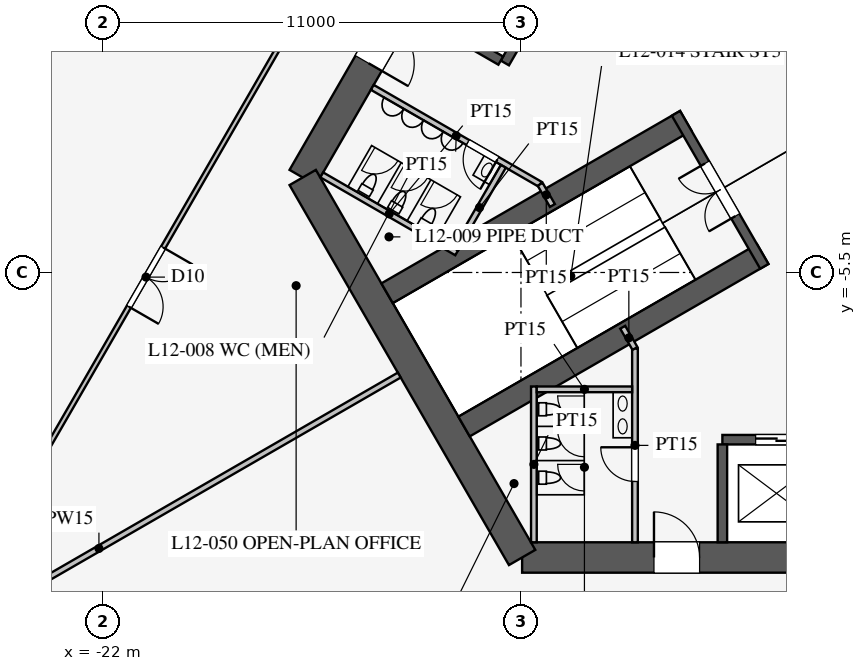
"""IFC4 building model, lengths in metres.
Left out: names, types, materials, properties, quantities, classifications, styles, units other than length and angle.
Written with IfcOpenShell. Run it as: python <this file> out.ifc"""

import sys

from ifc_helpers import new_model, si_unit, direction, frame, frame_2d, origin, place, context, subcontext, project, spatial, rectangle, extrude, element, fill, save


model = new_model("IFC4")
c1 = context("Model", 3, precision=1e-05, world=origin(), true_north=direction((0.0, 1.0)))
c2 = subcontext(c1, "Body", "Model", "MODEL_VIEW")
j1 = project(units=[si_unit("LENGTHUNIT", "METRE"), si_unit("PLANEANGLEUNIT", "RADIAN")], contexts=[c1])
p1 = place(None, origin())
s1 = spatial("IfcSite", under=j1, at=p1, CompositionType="ELEMENT")
p2 = place(p1, origin())
s2 = spatial("IfcBuilding", under=s1, at=p2, CompositionType="ELEMENT")
p3 = place(p2, frame((0.0, 0.0, 54.3)))
s3 = spatial("IfcBuildingStorey", under=s2, at=p3, CompositionType="ELEMENT", Elevation=54.3)
p4 = place(p3, frame((-10.97, -13.0, 0.0), z_axis=(0.0, 0.0, 1.0), x_axis=(1.0, 0.0, 0.0)))
e1 = element("IfcWall", 1, at=p4, inside=s3, PredefinedType="SHEAR", context=c2, shape_type="SweptSolid", body=[
    extrude(rectangle(XDim=21.939, YDim=0.8, at=frame_2d((10.97, 0.0))), origin(), (0.0, 0.0, 1.0), 4.2),
])
p5 = place(p4, frame((17.27, 0.0, 0.0)))
e2 = element("IfcOpeningElement", 2, at=p5, cuts=e1, PredefinedType="OPENING", context=c2, shape_type="SweptSolid", body=[
    extrude(rectangle(XDim=1.2, YDim=2.1, at=frame_2d((0.6, 1.05))), frame((0.0, 0.41, 0.0), z_axis=(0.0, -1.0, 0.0), x_axis=(1.0, 0.0, 0.0)), (0.0, 0.0, 1.0), 0.82),
])
p6 = place(p4, frame((3.47, 0.0, 0.0)))
e3 = element("IfcOpeningElement", 3, at=p6, cuts=e1, PredefinedType="OPENING", context=c2, shape_type="SweptSolid", body=[
    extrude(rectangle(XDim=1.2, YDim=2.1, at=frame_2d((0.6, 1.05))), frame((0.0, 0.41, 0.0), z_axis=(0.0, -1.0, 0.0), x_axis=(1.0, 0.0, 0.0)), (0.0, 0.0, 1.0), 0.82),
])
p7 = place(p3, frame((-5.773, 16.0, 0.0), z_axis=(0.0, 0.0, 1.0), x_axis=(-0.500002442456, -0.866023993627, 0.0)))
e4 = element("IfcWall", 4, at=p7, inside=s3, PredefinedType="SHEAR", context=c2, shape_type="SweptSolid", body=[
    extrude(rectangle(XDim=21.939, YDim=0.8, at=frame_2d((10.97, 0.0))), origin(), (0.0, 0.0, 1.0), 4.2),
])
p8 = place(p7, frame((17.27, 0.0, 0.0)))
e5 = element("IfcOpeningElement", 5, at=p8, cuts=e4, PredefinedType="OPENING", context=c2, shape_type="SweptSolid", body=[
    extrude(rectangle(XDim=1.2, YDim=2.1, at=frame_2d((0.6, 1.05))), frame((0.0, 0.41, 0.0), z_axis=(0.0, -1.0, 0.0), x_axis=(1.0, 0.0, 0.0)), (0.0, 0.0, 1.0), 0.82),
])
p9 = place(p7, frame((3.47, 0.0, 0.0)))
e6 = element("IfcOpeningElement", 6, at=p9, cuts=e4, PredefinedType="OPENING", context=c2, shape_type="SweptSolid", body=[
    extrude(rectangle(XDim=1.2, YDim=2.1, at=frame_2d((0.6, 1.05))), frame((0.0, 0.41, 0.0), z_axis=(0.0, -1.0, 0.0), x_axis=(1.0, 0.0, 0.0)), (0.0, 0.0, 1.0), 0.82),
])
p10 = place(p3, frame((-16.743, -3.0, 0.0), z_axis=(0.0, 0.0, 1.0), x_axis=(0.499995765644, -0.866027848477, 0.0)))
e7 = element("IfcWall", 7, at=p10, inside=s3, PredefinedType="SHEAR", context=c2, shape_type="SweptSolid", body=[
    extrude(rectangle(XDim=11.547, YDim=0.8, at=frame_2d((5.773, 0.0))), origin(), (0.0, 0.0, 1.0), 4.2),
])
p11 = place(p3, frame((-5.7, -9.9, 0.0), z_axis=(0.0, 0.0, 1.0), x_axis=(1.0, 0.0, 0.0)))
e8 = element("IfcWall", 8, at=p11, inside=s3, PredefinedType="SHEAR", context=c2, shape_type="SweptSolid", body=[
    extrude(rectangle(XDim=11.4, YDim=0.25, at=frame_2d((5.7, 0.0))), origin(), (0.0, 0.0, 1.0), 4.2),
])
p12 = place(p11, frame((0.875, 0.0, 0.0)))
e9 = element("IfcOpeningElement", 9, at=p12, cuts=e8, PredefinedType="OPENING", context=c2, shape_type="SweptSolid", body=[
    extrude(rectangle(XDim=1.1, YDim=2.2, at=frame_2d((0.55, 1.1))), frame((0.0, 0.135, 0.0), z_axis=(0.0, -1.0, 0.0), x_axis=(1.0, 0.0, 0.0)), (0.0, 0.0, 1.0), 0.27),
])
p13 = place(p11, frame((3.725, 0.0, 0.0)))
e10 = element("IfcOpeningElement", 10, at=p13, cuts=e8, PredefinedType="OPENING", context=c2, shape_type="SweptSolid", body=[
    extrude(rectangle(XDim=1.1, YDim=2.2, at=frame_2d((0.55, 1.1))), frame((0.0, 0.135, 0.0), z_axis=(0.0, -1.0, 0.0), x_axis=(1.0, 0.0, 0.0)), (0.0, 0.0, 1.0), 0.27),
])
p14 = place(p11, frame((6.575, 0.0, 0.0)))
e11 = element("IfcOpeningElement", 11, at=p14, cuts=e8, PredefinedType="OPENING", context=c2, shape_type="SweptSolid", body=[
    extrude(rectangle(XDim=1.1, YDim=2.2, at=frame_2d((0.55, 1.1))), frame((0.0, 0.135, 0.0), z_axis=(0.0, -1.0, 0.0), x_axis=(1.0, 0.0, 0.0)), (0.0, 0.0, 1.0), 0.27),
])
p15 = place(p11, frame((9.425, 0.0, 0.0)))
e12 = element("IfcOpeningElement", 12, at=p15, cuts=e8, PredefinedType="OPENING", context=c2, shape_type="SweptSolid", body=[
    extrude(rectangle(XDim=1.1, YDim=2.2, at=frame_2d((0.55, 1.1))), frame((0.0, 0.135, 0.0), z_axis=(0.0, -1.0, 0.0), x_axis=(1.0, 0.0, 0.0)), (0.0, 0.0, 1.0), 0.27),
])
p16 = place(p3, frame((-5.7, -10.025, 0.0), z_axis=(0.0, 0.0, 1.0), x_axis=(0.0, -1.0, 0.0)))
e13 = element("IfcWall", 13, at=p16, inside=s3, PredefinedType="SHEAR", context=c2, shape_type="SweptSolid", body=[
    extrude(rectangle(XDim=2.575, YDim=0.25, at=frame_2d((1.288, 0.0))), origin(), (0.0, 0.0, 1.0), 4.2),
])
p17 = place(p3, frame((-5.724, 9.886, 0.0), z_axis=(0.0, 0.0, 1.0), x_axis=(-0.500001763848, -0.866024385424, 0.0)))
e14 = element("IfcWall", 14, at=p17, inside=s3, PredefinedType="SHEAR", context=c2, shape_type="SweptSolid", body=[
    extrude(rectangle(XDim=11.4, YDim=0.25, at=frame_2d((5.7, 0.0))), origin(), (0.0, 0.0, 1.0), 4.2),
])
p18 = place(p17, frame((6.525, 0.0, 0.0)))
e15 = element("IfcOpeningElement", 15, at=p18, cuts=e14, PredefinedType="OPENING", context=c2, shape_type="SweptSolid", body=[
    extrude(rectangle(XDim=1.2, YDim=2.2, at=frame_2d((0.6, 1.1))), frame((0.0, 0.135, 0.0), z_axis=(0.0, -1.0, 0.0), x_axis=(1.0, 0.0, 0.0)), (0.0, 0.0, 1.0), 0.27),
])
p19 = place(p17, frame((9.375, 0.0, 0.0)))
e16 = element("IfcOpeningElement", 16, at=p19, cuts=e14, PredefinedType="OPENING", context=c2, shape_type="SweptSolid", body=[
    extrude(rectangle(XDim=1.2, YDim=2.2, at=frame_2d((0.6, 1.1))), frame((0.0, 0.135, 0.0), z_axis=(0.0, -1.0, 0.0), x_axis=(1.0, 0.0, 0.0)), (0.0, 0.0, 1.0), 0.27),
])
p20 = place(p3, frame((-11.532, 0.076, 0.0), z_axis=(0.0, 0.0, 1.0), x_axis=(-0.866005588531, 0.500034319456, 0.0)))
e17 = element("IfcWall", 17, at=p20, inside=s3, PredefinedType="SHEAR", context=c2, shape_type="SweptSolid", body=[
    extrude(rectangle(XDim=2.575, YDim=0.25, at=frame_2d((1.288, 0.0))), origin(), (0.0, 0.0, 1.0), 4.2),
])
for number, where, z_axis, x_axis in (
    (18, (-6.663, -1.509, 0.0), (0.0, 0.0, 1.0), (-0.866, -0.5, 0.0)),
    (19, (-4.638, -5.016, 0.0), (0.0, 0.0, 1.0), (-0.866, -0.5, 0.0)),
):
    element("IfcWall", number, at=place(p3, frame(where, z_axis=z_axis, x_axis=x_axis)), inside=s3, PredefinedType="SHEAR", context=c2, shape_type="SweptSolid", body=[
        extrude(rectangle(XDim=9.075, YDim=0.6, at=frame_2d((4.538, 0.0))), origin(), (0.0, 0.0, 1.0), 4.2),
    ])
p21 = place(p3, frame((-6.922, -1.312, 0.0), z_axis=(0.0, 0.0, 1.0), x_axis=(0.499984536904, -0.866034331223, 0.0)))
e20 = element("IfcWall", 20, at=p21, inside=s3, PredefinedType="SHEAR", context=c2, shape_type="SweptSolid", body=[
    extrude(rectangle(XDim=4.65, YDim=0.25, at=frame_2d((2.325, 0.0))), origin(), (0.0, 0.0, 1.0), 4.2),
])
p22 = place(p21, frame((1.525, 0.0, 0.0)))
e21 = element("IfcOpeningElement", 21, at=p22, cuts=e20, PredefinedType="OPENING", context=c2, shape_type="SweptSolid", body=[
    extrude(rectangle(XDim=1.6, YDim=2.1, at=frame_2d((0.8, 1.05))), frame((0.0, 0.135, 0.0), z_axis=(0.0, -1.0, 0.0), x_axis=(1.0, 0.0, 0.0)), (0.0, 0.0, 1.0), 0.27),
])
p23 = place(p3, frame((-8.0, -7.5, 0.0), z_axis=(0.0, 0.0, 1.0), x_axis=(0.0, -1.0, 0.0)))
e22 = element("IfcWall", 22, at=p23, inside=s3, PredefinedType="PARTITIONING", context=c2, shape_type="SweptSolid", body=[
    extrude(rectangle(XDim=5.1, YDim=0.15, at=frame_2d((2.55, 0.0))), origin(), (0.0, 0.0, 1.0), 4.0),
])
p24 = place(p23, frame((2.6, 0.0, 0.0)))
e23 = element("IfcOpeningElement", 23, at=p24, cuts=e22, PredefinedType="OPENING", context=c2, shape_type="SweptSolid", body=[
    extrude(rectangle(XDim=0.9, YDim=2.1, at=frame_2d((0.45, 1.05))), frame((0.0, 0.085, 0.0), z_axis=(0.0, -1.0, 0.0), x_axis=(1.0, 0.0, 0.0)), (0.0, 0.0, 1.0), 0.17),
])
p25 = place(p3, frame((-10.495, -3.178, 0.0), z_axis=(0.0, 0.0, 1.0), x_axis=(-0.86602216432, 0.500005610874, 0.0)))
e24 = element("IfcWall", 24, at=p25, inside=s3, PredefinedType="PARTITIONING", context=c2, shape_type="SweptSolid", body=[
    extrude(rectangle(XDim=5.1, YDim=0.15, at=frame_2d((2.55, 0.0))), origin(), (0.0, 0.0, 1.0), 4.0),
])
p26 = place(p25, frame((1.3, 0.0, 0.0)))
e25 = element("IfcOpeningElement", 25, at=p26, cuts=e24, PredefinedType="OPENING", context=c2, shape_type="SweptSolid", body=[
    extrude(rectangle(XDim=0.9, YDim=2.1, at=frame_2d((0.45, 1.05))), frame((0.0, 0.085, 0.0), z_axis=(0.0, -1.0, 0.0), x_axis=(1.0, 0.0, 0.0)), (0.0, 0.0, 1.0), 0.17),
])
for number, where, z_axis, x_axis in (
    (26, (-10.495, -3.178, 0.0), (0.0, 0.0, 1.0), (0.5, -0.866, 0.0)),
    (27, (-8.0, -7.5, 0.0), (0.0, 0.0, 1.0), (-0.5, 0.866, 0.0)),
):
    element("IfcWall", number, at=place(p3, frame(where, z_axis=z_axis, x_axis=x_axis)), inside=s3, PredefinedType="PARTITIONING", context=c2, shape_type="SweptSolid", body=[
        extrude(rectangle(XDim=0.645, YDim=0.15, at=frame_2d((0.323, 0.0))), origin(), (0.0, 0.0, 1.0), 4.0),
    ])
p27 = place(p3, frame((-12.691, -4.982, 0.0), z_axis=(0.0, 0.0, 1.0), x_axis=(-0.8660249478, 0.500000789788, 0.0)))
e28 = element("IfcWall", 28, at=p27, inside=s3, PredefinedType="PARTITIONING", context=c2, shape_type="SweptSolid", body=[
    extrude(rectangle(XDim=4.1, YDim=0.15, at=frame_2d((2.05, 0.0))), origin(), (0.0, 0.0, 1.0), 4.0),
])
p28 = place(p3, frame((-11.464, -2.706, 0.0), z_axis=(0.0, 0.0, 1.0), x_axis=(-0.50001992892, -0.866013897511, 0.0)))
e29 = element("IfcWall", 29, at=p28, inside=s3, PredefinedType="PARTITIONING", context=c2, shape_type="SweptSolid", body=[
    extrude(rectangle(XDim=2.51, YDim=0.15, at=frame_2d((1.255, 0.0))), origin(), (0.0, 0.0, 1.0), 4.0),
])
p29 = place(p3, frame((-10.66, -8.5, 0.0), z_axis=(0.0, 0.0, 1.0), x_axis=(0.0, -1.0, 0.0)))
e30 = element("IfcWall", 30, at=p29, inside=s3, PredefinedType="PARTITIONING", context=c2, shape_type="SweptSolid", body=[
    extrude(rectangle(XDim=4.1, YDim=0.15, at=frame_2d((2.05, 0.0))), origin(), (0.0, 0.0, 1.0), 4.0),
])
p30 = place(p3, frame((-8.075, -8.575, 0.0), z_axis=(0.0, 0.0, 1.0), x_axis=(-1.0, 0.0, 0.0)))
e31 = element("IfcWall", 31, at=p30, inside=s3, PredefinedType="PARTITIONING", context=c2, shape_type="SweptSolid", body=[
    extrude(rectangle(XDim=2.51, YDim=0.15, at=frame_2d((1.255, 0.0))), origin(), (0.0, 0.0, 1.0), 4.0),
])
p31 = place(p3, frame((-14.203, -8.2, 0.0), z_axis=(0.0, 0.0, 1.0), x_axis=(-0.866024965723, -0.500000758745, 0.0)))
e32 = element("IfcWall", 32, at=p31, inside=s3, PredefinedType="PARTITIONING", context=c2, shape_type="SweptSolid", body=[
    extrude(rectangle(XDim=18.25, YDim=0.15, at=frame_2d((9.125, 0.0))), origin(), (0.0, 0.0, 1.0), 2.3),
])
p32 = place(p3, frame((-0.016, 30.491, 0.0), z_axis=(0.0, 0.0, 1.0), x_axis=(-0.50000091641, -0.866024874695, 0.0)))
e33 = element("IfcWall", 33, at=p32, inside=s3, PredefinedType="PARTITIONING", context=c2, shape_type="SweptSolid", body=[
    extrude(rectangle(XDim=52.796, YDim=0.12, at=frame_2d((26.398, 0.0))), origin(), (0.0, 0.0, 1.0), 2.9),
])
p33 = place(p32, frame((10.2, 0.0, 0.15)))
e34 = element("IfcOpeningElement", 34, at=p33, cuts=e33, PredefinedType="OPENING", context=c2, shape_type="SweptSolid", body=[
    extrude(rectangle(XDim=1.8, YDim=2.1, at=frame_2d((0.9, 1.05))), frame((0.0, 0.07, 0.0), z_axis=(0.0, -1.0, 0.0), x_axis=(1.0, 0.0, 0.0)), (0.0, 0.0, 1.0), 0.14),
])
p34 = place(p32, frame((40.8, 0.0, 0.15)))
e35 = element("IfcOpeningElement", 35, at=p34, cuts=e33, PredefinedType="OPENING", context=c2, shape_type="SweptSolid", body=[
    extrude(rectangle(XDim=1.8, YDim=2.1, at=frame_2d((0.9, 1.05))), frame((0.0, 0.07, 0.0), z_axis=(0.0, -1.0, 0.0), x_axis=(1.0, 0.0, 0.0)), (0.0, 0.0, 1.0), 0.14),
])
p35 = place(p24, frame((0.9, 0.0, 0.0), z_axis=(0.0, 0.0, 1.0), x_axis=(-1.0, 0.0, 0.0)))
e36 = element("IfcDoor", 36, at=p35, inside=s3, OperationType="SINGLE_SWING_RIGHT", PredefinedType="DOOR", context=c2, shape_type="SweptSolid", body=[
    extrude(rectangle(XDim=0.9, YDim=2.1, at=frame_2d((0.45, 1.05))), frame((0.0, 0.025, 0.0), z_axis=(0.0, -1.0, 0.0), x_axis=(1.0, 0.0, 0.0)), (0.0, 0.0, 1.0), 0.05),
])
fill(e23, e36)
p36 = place(p26, origin())
e37 = element("IfcDoor", 37, at=p36, inside=s3, OperationType="SINGLE_SWING_LEFT", PredefinedType="DOOR", context=c2, shape_type="SweptSolid", body=[
    extrude(rectangle(XDim=0.9, YDim=2.1, at=frame_2d((0.45, 1.05))), frame((0.0, 0.025, 0.0), z_axis=(0.0, -1.0, 0.0), x_axis=(1.0, 0.0, 0.0)), (0.0, 0.0, 1.0), 0.05),
])
fill(e25, e37)
p37 = place(p22, frame((1.6, 0.0, 0.0), z_axis=(0.0, 0.0, 1.0), x_axis=(-1.0, 0.0, 0.0)))
e38 = element("IfcDoor", 38, at=p37, inside=s3, OperationType="DOUBLE_DOOR_SINGLE_SWING", PredefinedType="DOOR", context=c2, shape_type="SweptSolid", body=[
    extrude(rectangle(XDim=1.6, YDim=2.1, at=frame_2d((0.8, 1.05))), frame((0.0, 0.025, 0.0), z_axis=(0.0, -1.0, 0.0), x_axis=(1.0, 0.0, 0.0)), (0.0, 0.0, 1.0), 0.05),
])
fill(e21, e38)
p38 = place(p6, origin())
e39 = element("IfcDoor", 39, at=p38, inside=s3, OperationType="SINGLE_SWING_LEFT", PredefinedType="DOOR", context=c2, shape_type="SweptSolid", body=[
    extrude(rectangle(XDim=1.2, YDim=2.1, at=frame_2d((0.6, 1.05))), frame((0.0, 0.025, 0.0), z_axis=(0.0, -1.0, 0.0), x_axis=(1.0, 0.0, 0.0)), (0.0, 0.0, 1.0), 0.05),
])
fill(e3, e39)
p39 = place(p8, origin())
e40 = element("IfcDoor", 40, at=p39, inside=s3, OperationType="SINGLE_SWING_RIGHT", PredefinedType="DOOR", context=c2, shape_type="SweptSolid", body=[
    extrude(rectangle(XDim=1.2, YDim=2.1, at=frame_2d((0.6, 1.05))), frame((0.0, 0.025, 0.0), z_axis=(0.0, -1.0, 0.0), x_axis=(1.0, 0.0, 0.0)), (0.0, 0.0, 1.0), 0.05),
])
fill(e5, e40)
p40 = place(p34, origin())
e41 = element("IfcDoor", 41, at=p40, inside=s3, OperationType="DOUBLE_DOOR_SINGLE_SWING", PredefinedType="DOOR", context=c2, shape_type="SweptSolid", body=[
    extrude(rectangle(XDim=1.8, YDim=2.1, at=frame_2d((0.9, 1.05))), frame((0.0, 0.025, 0.0), z_axis=(0.0, -1.0, 0.0), x_axis=(1.0, 0.0, 0.0)), (0.0, 0.0, 1.0), 0.05),
])
fill(e35, e41)
p41 = place(p12, origin())
e42 = element("IfcDoor", 42, at=p41, inside=s3, OperationType="DOUBLE_DOOR_SLIDING", PredefinedType="DOOR", context=c2, shape_type="SweptSolid", body=[
    extrude(rectangle(XDim=1.1, YDim=2.2, at=frame_2d((0.55, 1.1))), frame((0.0, 0.025, 0.0), z_axis=(0.0, -1.0, 0.0), x_axis=(1.0, 0.0, 0.0)), (0.0, 0.0, 1.0), 0.05),
])
fill(e9, e42)
save(model, sys.argv[1])
